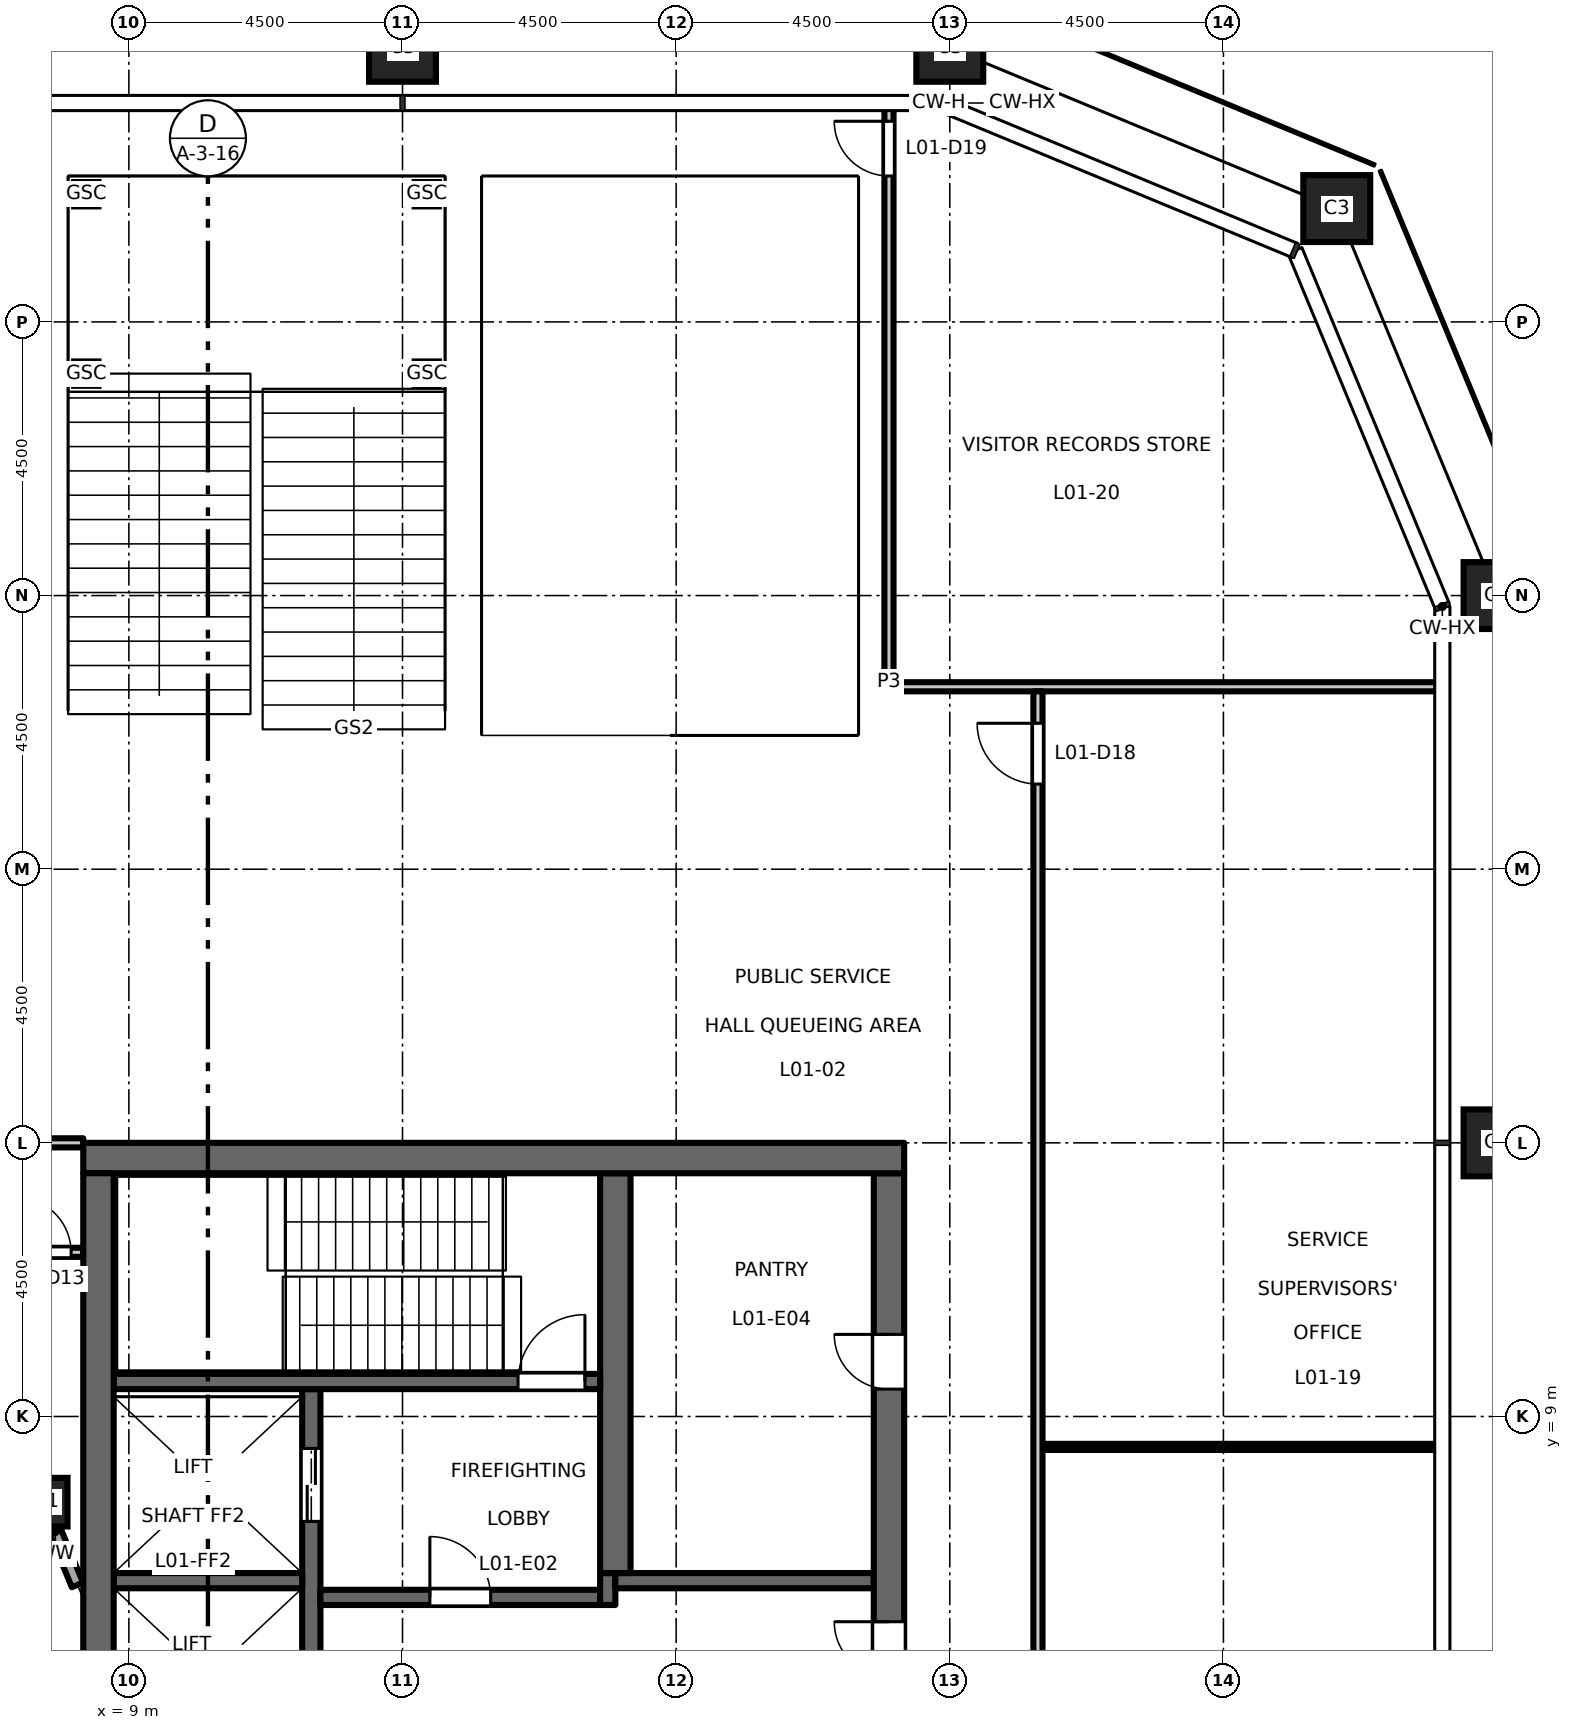
"""IFC4 building model, lengths in metres.
Left out: names, types, materials, properties, quantities, classifications, styles, units other than length and angle.
Written with IfcOpenShell. Run it as: python <this file> out.ifc"""

import sys

from ifc_helpers import new_model, si_unit, direction, frame, frame_2d, origin, origin_2d, place, context, subcontext, project, spatial, rectangle, hollow_rectangle, extrude, element, fill, save


model = new_model("IFC4")
c1 = context("Model", 3, precision=1e-05, world=origin(), true_north=direction((0.0, 1.0)))
c2 = subcontext(c1, "Body", "Model", "MODEL_VIEW")
j1 = project(units=[si_unit("LENGTHUNIT", "METRE"), si_unit("PLANEANGLEUNIT", "RADIAN")], contexts=[c1])
p1 = place(None, origin())
s1 = spatial("IfcSite", under=j1, at=p1, CompositionType="ELEMENT")
p2 = place(p1, origin())
s2 = spatial("IfcBuilding", under=s1, at=p2, CompositionType="ELEMENT")
p3 = place(p2, frame((0.0, 0.0, 7.2)))
s3 = spatial("IfcBuildingStorey", under=s2, at=p3, CompositionType="ELEMENT", Elevation=7.2)
for number, where, z_axis, x_axis in (
    (1, (31.5, 13.5, 0.0), (0.0, 0.0, 1.0), (1.0, 0.0, 0.0)),
    (2, (31.5, 22.5, 0.0), (0.0, 0.0, 1.0), (1.0, 0.0, 0.0)),
    (3, (28.864, 28.864, 0.0), (0.0, 0.0, 1.0), (1.0, 0.0, 0.0)),
    (4, (22.5, 31.5, 0.0), (0.0, 0.0, 1.0), (1.0, 0.0, 0.0)),
    (5, (13.5, 31.5, 0.0), (0.0, 0.0, 1.0), (1.0, 0.0, 0.0)),
):
    element("IfcColumn", number, at=place(p3, frame(where, z_axis=z_axis, x_axis=x_axis)), inside=s3, PredefinedType="COLUMN", context=c2, shape_type="SweptSolid", body=[
        extrude(hollow_rectangle(XDim=1.1, YDim=1.1, WallThickness=0.07, at=origin_2d()), origin(), (0.0, 0.0, 1.0), 5.0),
    ])
p4 = place(p3, frame((7.591, 7.591, 0.0), z_axis=(0.0, 0.0, 1.0), x_axis=(1.0, 0.0, 0.0)))
e6 = element("IfcColumn", 6, at=p4, inside=s3, PredefinedType="COLUMN", context=c2, shape_type="SweptSolid", body=[
    extrude(hollow_rectangle(XDim=0.8, YDim=0.8, WallThickness=0.05, at=origin_2d()), origin(), (0.0, 0.0, 1.0), 5.0),
])
p5 = place(p3, frame((12.0, -9.45, 0.0), z_axis=(0.0, 0.0, 1.0), x_axis=(0.0, 1.0, 0.0)))
e7 = element("IfcWall", 7, at=p5, inside=s3, PredefinedType="SHEAR", context=c2, shape_type="SweptSolid", body=[
    extrude(rectangle(XDim=18.9, YDim=0.3, at=frame_2d((9.45, 0.0))), origin(), (0.0, 0.0, 1.0), 4.8),
])
p6 = place(p5, frame((3.625, 0.0, 0.0)))
e8 = element("IfcOpeningElement", 8, at=p6, cuts=e7, PredefinedType="OPENING", context=c2, shape_type="SweptSolid", body=[
    extrude(rectangle(XDim=1.1, YDim=2.1, at=frame_2d((0.55, 1.05))), frame((0.0, 0.16, 0.0), z_axis=(0.0, -1.0, 0.0), x_axis=(1.0, 0.0, 0.0)), (0.0, 0.0, 1.0), 0.32),
])
p7 = place(p5, frame((6.775, 0.0, 0.0)))
e9 = element("IfcOpeningElement", 9, at=p7, cuts=e7, PredefinedType="OPENING", context=c2, shape_type="SweptSolid", body=[
    extrude(rectangle(XDim=1.1, YDim=2.1, at=frame_2d((0.55, 1.05))), frame((0.0, 0.16, 0.0), z_axis=(0.0, -1.0, 0.0), x_axis=(1.0, 0.0, 0.0)), (0.0, 0.0, 1.0), 0.32),
])
p8 = place(p5, frame((9.925, 0.0, 0.0)))
e10 = element("IfcOpeningElement", 10, at=p8, cuts=e7, PredefinedType="OPENING", context=c2, shape_type="SweptSolid", body=[
    extrude(rectangle(XDim=1.1, YDim=2.1, at=frame_2d((0.55, 1.05))), frame((0.0, 0.16, 0.0), z_axis=(0.0, -1.0, 0.0), x_axis=(1.0, 0.0, 0.0)), (0.0, 0.0, 1.0), 0.32),
])
p9 = place(p5, frame((13.075, 0.0, 0.0)))
e11 = element("IfcOpeningElement", 11, at=p9, cuts=e7, PredefinedType="OPENING", context=c2, shape_type="SweptSolid", body=[
    extrude(rectangle(XDim=1.1, YDim=2.1, at=frame_2d((0.55, 1.05))), frame((0.0, 0.16, 0.0), z_axis=(0.0, -1.0, 0.0), x_axis=(1.0, 0.0, 0.0)), (0.0, 0.0, 1.0), 0.32),
])
p10 = place(p5, frame((16.725, 0.0, 0.0)))
e12 = element("IfcOpeningElement", 12, at=p10, cuts=e7, PredefinedType="OPENING", context=c2, shape_type="SweptSolid", body=[
    extrude(rectangle(XDim=1.2, YDim=2.1, at=frame_2d((0.6, 1.05))), frame((0.0, 0.16, 0.0), z_axis=(0.0, -1.0, 0.0), x_axis=(1.0, 0.0, 0.0)), (0.0, 0.0, 1.0), 0.32),
])
p11 = place(p5, frame((0.975, 0.0, 0.0)))
e13 = element("IfcOpeningElement", 13, at=p11, cuts=e7, PredefinedType="OPENING", context=c2, shape_type="SweptSolid", body=[
    extrude(rectangle(XDim=1.2, YDim=2.1, at=frame_2d((0.6, 1.05))), frame((0.0, 0.16, 0.0), z_axis=(0.0, -1.0, 0.0), x_axis=(1.0, 0.0, 0.0)), (0.0, 0.0, 1.0), 0.32),
])
p12 = place(p3, frame((12.15, 6.025, 0.0), z_axis=(0.0, 0.0, 1.0), x_axis=(1.0, 0.0, 0.0)))
e14 = element("IfcWall", 14, at=p12, inside=s3, PredefinedType="SHEAR", context=c2, shape_type="SweptSolid", body=[
    extrude(rectangle(XDim=4.6, YDim=0.25, at=frame_2d((2.3, 0.0))), origin(), (0.0, 0.0, 1.0), 4.8),
])
p13 = place(p12, frame((1.8, 0.0, 0.0)))
e15 = element("IfcOpeningElement", 15, at=p13, cuts=e14, PredefinedType="OPENING", context=c2, shape_type="SweptSolid", body=[
    extrude(rectangle(XDim=1.0, YDim=2.1, at=frame_2d((0.5, 1.05))), frame((0.0, 0.135, 0.0), z_axis=(0.0, -1.0, 0.0), x_axis=(1.0, 0.0, 0.0)), (0.0, 0.0, 1.0), 0.27),
])
p14 = place(p3, frame((16.875, 5.9, 0.0), z_axis=(0.0, 0.0, 1.0), x_axis=(0.0, 1.0, 0.0)))
e16 = element("IfcWall", 16, at=p14, inside=s3, PredefinedType="SHEAR", context=c2, shape_type="SweptSolid", body=[
    extrude(rectangle(XDim=0.525, YDim=0.25, at=frame_2d((0.263, 0.0))), origin(), (0.0, 0.0, 1.0), 4.8),
])
p15 = place(p3, frame((17.0, 6.3, 0.0), z_axis=(0.0, 0.0, 1.0), x_axis=(1.0, 0.0, 0.0)))
e17 = element("IfcWall", 17, at=p15, inside=s3, PredefinedType="SHEAR", context=c2, shape_type="SweptSolid", body=[
    extrude(rectangle(XDim=4.25, YDim=0.25, at=frame_2d((2.125, 0.0))), origin(), (0.0, 0.0, 1.0), 4.8),
])
p16 = place(p3, frame((21.5, -13.0, 0.0), z_axis=(0.0, 0.0, 1.0), x_axis=(0.0, 1.0, 0.0)))
e18 = element("IfcWall", 18, at=p16, inside=s3, PredefinedType="SHEAR", context=c2, shape_type="SweptSolid", body=[
    extrude(rectangle(XDim=26.0, YDim=0.5, at=frame_2d((13.0, 0.0))), origin(), (0.0, 0.0, 1.0), 4.8),
])
p17 = place(p16, frame((16.825, 0.0, 0.0)))
e19 = element("IfcOpeningElement", 19, at=p17, cuts=e18, PredefinedType="OPENING", context=c2, shape_type="SweptSolid", body=[
    extrude(rectangle(XDim=1.8, YDim=2.1, at=frame_2d((0.9, 1.05))), frame((0.0, 0.26, 0.0), z_axis=(0.0, -1.0, 0.0), x_axis=(1.0, 0.0, 0.0)), (0.0, 0.0, 1.0), 0.52),
])
p18 = place(p16, frame((7.375, 0.0, 0.0)))
e20 = element("IfcOpeningElement", 20, at=p18, cuts=e18, PredefinedType="OPENING", context=c2, shape_type="SweptSolid", body=[
    extrude(rectangle(XDim=1.8, YDim=2.1, at=frame_2d((0.9, 1.05))), frame((0.0, 0.26, 0.0), z_axis=(0.0, -1.0, 0.0), x_axis=(1.0, 0.0, 0.0)), (0.0, 0.0, 1.0), 0.52),
])
p19 = place(p16, frame((22.45, 0.0, 0.0)))
e21 = element("IfcOpeningElement", 21, at=p19, cuts=e18, PredefinedType="OPENING", context=c2, shape_type="SweptSolid", body=[
    extrude(rectangle(XDim=0.9, YDim=2.1, at=frame_2d((0.45, 1.05))), frame((0.0, 0.26, 0.0), z_axis=(0.0, -1.0, 0.0), x_axis=(1.0, 0.0, 0.0)), (0.0, 0.0, 1.0), 0.52),
])
p20 = place(p16, frame((1.7, 0.0, 0.0)))
e22 = element("IfcOpeningElement", 22, at=p20, cuts=e18, PredefinedType="OPENING", context=c2, shape_type="SweptSolid", body=[
    extrude(rectangle(XDim=0.9, YDim=2.1, at=frame_2d((0.45, 1.05))), frame((0.0, 0.26, 0.0), z_axis=(0.0, -1.0, 0.0), x_axis=(1.0, 0.0, 0.0)), (0.0, 0.0, 1.0), 0.52),
])
p21 = place(p3, frame((17.0, 6.425, 0.0), z_axis=(0.0, 0.0, 1.0), x_axis=(0.0, 1.0, 0.0)))
e23 = element("IfcWall", 23, at=p21, inside=s3, PredefinedType="SHEAR", context=c2, shape_type="SweptSolid", body=[
    extrude(rectangle(XDim=6.575, YDim=0.5, at=frame_2d((3.288, 0.0))), origin(), (0.0, 0.0, 1.0), 4.8),
])
p22 = place(p3, frame((8.75, 6.3, 0.0), z_axis=(0.0, 0.0, 1.0), x_axis=(1.0, 0.0, 0.0)))
e24 = element("IfcWall", 24, at=p22, inside=s3, PredefinedType="SHEAR", context=c2, shape_type="SweptSolid", body=[
    extrude(rectangle(XDim=3.1, YDim=0.25, at=frame_2d((1.55, 0.0))), origin(), (0.0, 0.0, 1.0), 4.8),
])
p23 = place(p3, frame((8.75, 9.575, 0.0), z_axis=(0.0, 0.0, 1.0), x_axis=(1.0, 0.0, 0.0)))
e25 = element("IfcWall", 25, at=p23, inside=s3, PredefinedType="SHEAR", context=c2, shape_type="SweptSolid", body=[
    extrude(rectangle(XDim=8.0, YDim=0.25, at=frame_2d((4.0, 0.0))), origin(), (0.0, 0.0, 1.0), 4.8),
])
p24 = place(p23, frame((6.65, 0.0, 0.0)))
e26 = element("IfcOpeningElement", 26, at=p24, cuts=e25, PredefinedType="OPENING", context=c2, shape_type="SweptSolid", body=[
    extrude(rectangle(XDim=1.1, YDim=2.1, at=frame_2d((0.55, 1.05))), frame((0.0, 0.135, 0.0), z_axis=(0.0, -1.0, 0.0), x_axis=(1.0, 0.0, 0.0)), (0.0, 0.0, 1.0), 0.27),
])
p25 = place(p3, frame((8.25, 13.25, 0.0), z_axis=(0.0, 0.0, 1.0), x_axis=(1.0, 0.0, 0.0)))
e27 = element("IfcWall", 27, at=p25, inside=s3, PredefinedType="SHEAR", context=c2, shape_type="SweptSolid", body=[
    extrude(rectangle(XDim=13.5, YDim=0.5, at=frame_2d((6.75, 0.0))), origin(), (0.0, 0.0, 1.0), 4.8),
])
p26 = place(p3, frame((8.5, -13.0, 0.0), z_axis=(0.0, 0.0, 1.0), x_axis=(0.0, 1.0, 0.0)))
e28 = element("IfcWall", 28, at=p26, inside=s3, PredefinedType="SHEAR", context=c2, shape_type="SweptSolid", body=[
    extrude(rectangle(XDim=26.0, YDim=0.5, at=frame_2d((13.0, 0.0))), origin(), (0.0, 0.0, 1.0), 4.8),
])
p27 = place(p3, frame((8.154, 6.231, 0.0), z_axis=(0.0, 0.0, 1.0), x_axis=(-0.382624318388, 0.923904016107, 0.0)))
e29 = element("IfcWall", 29, at=p27, inside=s3, PredefinedType="STANDARD", context=c2, shape_type="SweptSolid", body=[
    extrude(rectangle(XDim=0.949, YDim=0.2, at=frame_2d((0.475, 0.0))), origin(), (0.0, 0.0, 1.0), 4.18),
])
for number, where, z_axis, x_axis in (
    (30, (8.3, 29.1, 0.0), (0.0, 0.0, 1.0), (1.0, 0.0, 0.0)),
    (31, (8.3, 26.15, 0.0), (0.0, 0.0, 1.0), (1.0, 0.0, 0.0)),
    (32, (13.9, 29.1, 0.0), (0.0, 0.0, 1.0), (1.0, 0.0, 0.0)),
    (33, (13.9, 26.15, 0.0), (0.0, 0.0, 1.0), (1.0, 0.0, 0.0)),
):
    element("IfcColumn", number, at=place(p3, frame(where, z_axis=z_axis, x_axis=x_axis)), inside=s3, PredefinedType="COLUMN", context=c2, shape_type="SweptSolid", body=[
        extrude(rectangle(XDim=0.4, YDim=0.4, at=origin_2d()), origin(), (0.0, 0.0, 1.0), 2.2),
    ])
p28 = place(p3, frame((24.025, 8.5, 0.0), z_axis=(0.0, 0.0, 1.0), x_axis=(1.0, 0.0, 0.0)))
e34 = element("IfcWall", 34, at=p28, inside=s3, PredefinedType="PARTITIONING", context=c2, shape_type="SweptSolid", body=[
    extrude(rectangle(XDim=6.485, YDim=0.1, at=frame_2d((3.243, 0.0))), origin(), (0.0, 0.0, 1.0), 4.8),
])
p29 = place(p3, frame((7.0, 11.7, 0.0), z_axis=(0.0, 0.0, 1.0), x_axis=(1.0, 0.0, 0.0)))
e35 = element("IfcWall", 35, at=p29, inside=s3, PredefinedType="PARTITIONING", context=c2, shape_type="SweptSolid", body=[
    extrude(rectangle(XDim=1.25, YDim=0.15, at=frame_2d((0.625, 0.0))), origin(), (0.0, 0.0, 1.0), 4.8),
])
p30 = place(p29, frame((0.15, 0.0, 0.0)))
e36 = element("IfcOpeningElement", 36, at=p30, cuts=e35, PredefinedType="OPENING", context=c2, shape_type="SweptSolid", body=[
    extrude(rectangle(XDim=0.9, YDim=2.1, at=frame_2d((0.45, 1.05))), frame((0.0, 0.085, 0.0), z_axis=(0.0, -1.0, 0.0), x_axis=(1.0, 0.0, 0.0)), (0.0, 0.0, 1.0), 0.17),
])
p31 = place(p3, frame((-8.25, 13.5, 0.0), z_axis=(0.0, 0.0, 1.0), x_axis=(1.0, 0.0, 0.0)))
e37 = element("IfcWall", 37, at=p31, inside=s3, PredefinedType="PARTITIONING", context=c2, shape_type="SweptSolid", body=[
    extrude(rectangle(XDim=16.5, YDim=0.15, at=frame_2d((8.25, 0.0))), origin(), (0.0, 0.0, 1.0), 4.3),
])
p32 = place(p31, frame((0.65, 0.0, 0.0)))
e38 = element("IfcOpeningElement", 38, at=p32, cuts=e37, PredefinedType="OPENING", context=c2, shape_type="SweptSolid", body=[
    extrude(rectangle(XDim=1.0, YDim=2.1, at=frame_2d((0.5, 1.05))), frame((0.0, 0.085, 0.0), z_axis=(0.0, -1.0, 0.0), x_axis=(1.0, 0.0, 0.0)), (0.0, 0.0, 1.0), 0.17),
])
p33 = place(p3, frame((21.425, 21.0, 0.0), z_axis=(0.0, 0.0, 1.0), x_axis=(1.0, 0.0, 0.0)))
e39 = element("IfcWall", 39, at=p33, inside=s3, PredefinedType="PARTITIONING", context=c2, shape_type="SweptSolid", body=[
    extrude(rectangle(XDim=9.085, YDim=0.15, at=frame_2d((4.542, 0.0))), origin(), (0.0, 0.0, 1.0), 4.8),
])
p34 = place(p3, frame((21.5, 21.075, 0.0), z_axis=(0.0, 0.0, 1.0), x_axis=(0.0, 1.0, 0.0)))
e40 = element("IfcWall", 40, at=p34, inside=s3, PredefinedType="PARTITIONING", context=c2, shape_type="SweptSolid", body=[
    extrude(rectangle(XDim=9.435, YDim=0.15, at=frame_2d((4.718, 0.0))), origin(), (0.0, 0.0, 1.0), 4.8),
])
p35 = place(p34, frame((8.325, 0.0, 0.0)))
e41 = element("IfcOpeningElement", 41, at=p35, cuts=e40, PredefinedType="OPENING", context=c2, shape_type="SweptSolid", body=[
    extrude(rectangle(XDim=0.9, YDim=2.1, at=frame_2d((0.45, 1.05))), frame((0.0, 0.085, 0.0), z_axis=(0.0, -1.0, 0.0), x_axis=(1.0, 0.0, 0.0)), (0.0, 0.0, 1.0), 0.17),
])
p36 = place(p3, frame((23.95, 1.875, 0.0), z_axis=(0.0, 0.0, 1.0), x_axis=(0.0, 1.0, 0.0)))
e42 = element("IfcWall", 42, at=p36, inside=s3, PredefinedType="PARTITIONING", context=c2, shape_type="SweptSolid", body=[
    extrude(rectangle(XDim=19.05, YDim=0.15, at=frame_2d((9.525, 0.0))), origin(), (0.0, 0.0, 1.0), 4.8),
])
p37 = place(p36, frame((0.575, 0.0, 0.0)))
e43 = element("IfcOpeningElement", 43, at=p37, cuts=e42, PredefinedType="OPENING", context=c2, shape_type="SweptSolid", body=[
    extrude(rectangle(XDim=1.0, YDim=2.1, at=frame_2d((0.5, 1.05))), frame((0.0, 0.085, 0.0), z_axis=(0.0, -1.0, 0.0), x_axis=(1.0, 0.0, 0.0)), (0.0, 0.0, 1.0), 0.17),
])
p38 = place(p36, frame((17.525, 0.0, 0.0)))
e44 = element("IfcOpeningElement", 44, at=p38, cuts=e42, PredefinedType="OPENING", context=c2, shape_type="SweptSolid", body=[
    extrude(rectangle(XDim=1.0, YDim=2.1, at=frame_2d((0.5, 1.05))), frame((0.0, 0.085, 0.0), z_axis=(0.0, -1.0, 0.0), x_axis=(1.0, 0.0, 0.0)), (0.0, 0.0, 1.0), 0.17),
])
p39 = place(p13, origin())
e45 = element("IfcDoor", 45, at=p39, inside=s3, OperationType="SINGLE_SWING_RIGHT", PredefinedType="DOOR", context=c2, shape_type="SweptSolid", body=[
    extrude(rectangle(XDim=1.0, YDim=2.1, at=frame_2d((0.5, 1.05))), frame((0.0, 0.025, 0.0), z_axis=(0.0, -1.0, 0.0), x_axis=(1.0, 0.0, 0.0)), (0.0, 0.0, 1.0), 0.05),
])
fill(e15, e45)
p40 = place(p24, origin())
e46 = element("IfcDoor", 46, at=p40, inside=s3, OperationType="SINGLE_SWING_LEFT", PredefinedType="DOOR", context=c2, shape_type="SweptSolid", body=[
    extrude(rectangle(XDim=1.1, YDim=2.1, at=frame_2d((0.55, 1.05))), frame((0.0, 0.025, 0.0), z_axis=(0.0, -1.0, 0.0), x_axis=(1.0, 0.0, 0.0)), (0.0, 0.0, 1.0), 0.05),
])
fill(e26, e46)
p41 = place(p17, origin())
e47 = element("IfcDoor", 47, at=p41, inside=s3, OperationType="DOUBLE_DOOR_DOUBLE_SWING", PredefinedType="DOOR", context=c2, shape_type="SweptSolid", body=[
    extrude(rectangle(XDim=1.8, YDim=2.1, at=frame_2d((0.9, 1.05))), frame((0.0, 0.025, 0.0), z_axis=(0.0, -1.0, 0.0), x_axis=(1.0, 0.0, 0.0)), (0.0, 0.0, 1.0), 0.05),
])
fill(e19, e47)
p42 = place(p10, origin())
e48 = element("IfcDoor", 48, at=p42, inside=s3, OperationType="DOUBLE_DOOR_SLIDING", PredefinedType="DOOR", context=c2, shape_type="SweptSolid", body=[
    extrude(rectangle(XDim=1.2, YDim=2.1, at=frame_2d((0.6, 1.05))), frame((0.0, 0.025, 0.0), z_axis=(0.0, -1.0, 0.0), x_axis=(1.0, 0.0, 0.0)), (0.0, 0.0, 1.0), 0.05),
])
fill(e12, e48)
p43 = place(p19, origin())
e49 = element("IfcDoor", 49, at=p43, inside=s3, OperationType="SINGLE_SWING_LEFT", PredefinedType="DOOR", context=c2, shape_type="SweptSolid", body=[
    extrude(rectangle(XDim=0.9, YDim=2.1, at=frame_2d((0.45, 1.05))), frame((0.0, 0.025, 0.0), z_axis=(0.0, -1.0, 0.0), x_axis=(1.0, 0.0, 0.0)), (0.0, 0.0, 1.0), 0.05),
])
fill(e21, e49)
p44 = place(p30, origin())
e50 = element("IfcDoor", 50, at=p44, inside=s3, OperationType="SINGLE_SWING_LEFT", PredefinedType="DOOR", context=c2, shape_type="SweptSolid", body=[
    extrude(rectangle(XDim=0.9, YDim=2.1, at=frame_2d((0.45, 1.05))), frame((0.0, 0.025, 0.0), z_axis=(0.0, -1.0, 0.0), x_axis=(1.0, 0.0, 0.0)), (0.0, 0.0, 1.0), 0.05),
])
fill(e36, e50)
p45 = place(p38, origin())
e51 = element("IfcDoor", 51, at=p45, inside=s3, OperationType="SINGLE_SWING_RIGHT", PredefinedType="DOOR", context=c2, shape_type="SweptSolid", body=[
    extrude(rectangle(XDim=1.0, YDim=2.1, at=frame_2d((0.5, 1.05))), frame((0.0, 0.025, 0.0), z_axis=(0.0, -1.0, 0.0), x_axis=(1.0, 0.0, 0.0)), (0.0, 0.0, 1.0), 0.05),
])
fill(e44, e51)
p46 = place(p35, origin())
e52 = element("IfcDoor", 52, at=p46, inside=s3, OperationType="SINGLE_SWING_RIGHT", PredefinedType="DOOR", context=c2, shape_type="SweptSolid", body=[
    extrude(rectangle(XDim=0.9, YDim=2.1, at=frame_2d((0.45, 1.05))), frame((0.0, 0.025, 0.0), z_axis=(0.0, -1.0, 0.0), x_axis=(1.0, 0.0, 0.0)), (0.0, 0.0, 1.0), 0.05),
])
fill(e41, e52)
save(model, sys.argv[1])
